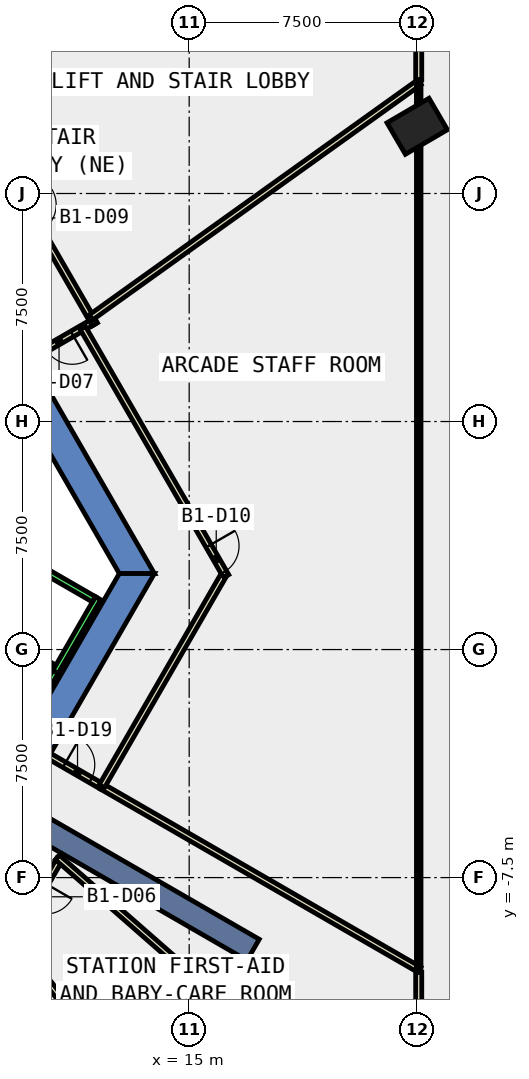
"""IFC4 building model, lengths in metres.
Left out: names, types, materials, properties, quantities, classifications, styles, units other than length and angle.
Written with IfcOpenShell. Run it as: python <this file> out.ifc"""

import sys

from ifc_helpers import new_model, si_unit, direction, frame, frame_2d, origin, origin_2d, place, context, subcontext, project, spatial, polyline, rectangle, outline, extrude, element, fill, save


model = new_model("IFC4")
c1 = context("Model", 3, precision=1e-05, world=origin(), true_north=direction((0.0, 1.0)))
c2 = subcontext(c1, "Body", "Model", "MODEL_VIEW")
j1 = project(units=[si_unit("LENGTHUNIT", "METRE"), si_unit("PLANEANGLEUNIT", "RADIAN")], contexts=[c1])
p1 = place(None, origin())
s1 = spatial("IfcSite", under=j1, at=p1, CompositionType="ELEMENT")
p2 = place(p1, origin())
s2 = spatial("IfcBuilding", under=s1, at=p2, CompositionType="ELEMENT")
p3 = place(p2, frame((0.0, 0.0, -5.5)))
s3 = spatial("IfcBuildingStorey", under=s2, at=p3, CompositionType="ELEMENT", Elevation=-5.5)
p4 = place(p3, frame((22.5, 17.211, -0.42), z_axis=(0.0, 0.0, 1.0), x_axis=(-0.504331712594, 0.863510002068, 0.0)))
e1 = element("IfcColumn", 1, at=p4, inside=s3, PredefinedType="COLUMN", context=c2, shape_type="SweptSolid", body=[
    extrude(rectangle(XDim=1.2, YDim=1.6, at=origin_2d()), origin(), (0.0, 0.0, 1.0), 5.42),
])
p5 = place(p3, frame((0.0, 0.0, -0.42)))
e2 = element("IfcWall", 2, at=p5, inside=s3, PredefinedType="SHEAR", context=c2, shape_type="SweptSolid", body=[
    extrude(outline(polyline([(8.517, 11.748), (7.651, 11.248), (12.702, 2.5), (13.856, 2.5), (8.517, 11.748)])), origin(), (0.0, 0.0, 1.0), 5.42),
])
p6 = place(p3, frame((0.0, 0.0, -0.42)))
e3 = element("IfcWall", 3, at=p6, inside=s3, PredefinedType="SHEAR", context=c2, shape_type="SweptSolid", body=[
    extrude(outline(polyline([(6.928, -9.5), (13.856, 2.5), (12.702, 2.5), (6.351, -8.5), (6.928, -9.5)])), origin(), (0.0, 0.0, 1.0), 5.42),
])
p7 = place(p3, frame((9.31, -5.375, -0.42), z_axis=(0.0, 0.0, 1.0), x_axis=(0.866017533419, -0.500013631625, 0.0)))
e4 = element("IfcWall", 4, at=p7, inside=s3, PredefinedType="SHEAR", context=c2, shape_type="SweptSolid", body=[
    extrude(rectangle(XDim=9.0, YDim=0.8, at=frame_2d((4.5, 0.0))), origin(), (0.0, 0.0, 1.0), 5.42),
])
p8 = place(p3, frame((10.738, -6.901, 0.0), z_axis=(0.0, 0.0, 1.0), x_axis=(-0.500131122175, -0.865949687125, 0.0)))
e5 = element("IfcWall", 5, at=p8, inside=s3, PredefinedType="PARTITIONING", context=c2, shape_type="SweptSolid", body=[
    extrude(rectangle(XDim=2.999, YDim=0.2, at=frame_2d((1.5, 0.0))), origin(), (0.0, 0.0, 1.0), 4.9),
])
p9 = place(p8, frame((0.921, 0.0, 0.0)))
e6 = element("IfcOpeningElement", 6, at=p9, cuts=e5, PredefinedType="OPENING", context=c2, shape_type="SweptSolid", body=[
    extrude(rectangle(XDim=1.0, YDim=2.1, at=frame_2d((0.5, 1.05))), frame((0.0, 0.11, 0.0), z_axis=(0.0, -1.0, 0.0), x_axis=(1.0, 0.0, 0.0)), (0.0, 0.0, 1.0), 0.22),
])
p10 = place(p3, frame((9.177, -9.419, 0.0), z_axis=(0.0, 0.0, 1.0), x_axis=(0.610138829962, -0.792294521104, 0.0)))
e7 = element("IfcWall", 7, at=p10, inside=s3, PredefinedType="PARTITIONING", context=c2, shape_type="SweptSolid", body=[
    extrude(rectangle(XDim=7.082, YDim=0.2, at=frame_2d((3.541, 0.0))), origin(), (0.0, 0.0, 1.0), 4.9),
])
p11 = place(p3, frame((10.663, -6.835, 0.0), z_axis=(0.0, 0.0, 1.0), x_axis=(0.752369729321, -0.658741064761, 0.0)))
e8 = element("IfcWall", 8, at=p11, inside=s3, PredefinedType="PARTITIONING", context=c2, shape_type="SweptSolid", body=[
    extrude(rectangle(XDim=12.571, YDim=0.2, at=frame_2d((6.286, 0.0))), origin(), (0.0, 0.0, 1.0), 4.9),
])
p12 = place(p3, frame((10.392, -3.5, 0.0), z_axis=(0.0, 0.0, 1.0), x_axis=(0.866010750942, -0.50002537861, 0.0)))
e9 = element("IfcWall", 9, at=p12, inside=s3, PredefinedType="PARTITIONING", context=c2, shape_type="SweptSolid", body=[
    extrude(rectangle(XDim=2.0, YDim=0.2, at=frame_2d((1.0, 0.0))), origin(), (0.0, 0.0, 1.0), 4.9),
])
p13 = place(p12, frame((0.58, 0.0, 0.0)))
e10 = element("IfcOpeningElement", 10, at=p13, cuts=e9, PredefinedType="OPENING", context=c2, shape_type="SweptSolid", body=[
    extrude(rectangle(XDim=1.0, YDim=2.1, at=frame_2d((0.5, 1.05))), frame((0.0, 0.11, 0.0), z_axis=(0.0, -1.0, 0.0), x_axis=(1.0, 0.0, 0.0)), (0.0, 0.0, 1.0), 0.22),
])
p14 = place(p3, frame((12.124, -4.5, 0.0), z_axis=(0.0, 0.0, 1.0), x_axis=(0.866066629319, -0.499928588481, 0.0)))
e11 = element("IfcWall", 11, at=p14, inside=s3, PredefinedType="PARTITIONING", context=c2, shape_type="SweptSolid", body=[
    extrude(rectangle(XDim=12.064, YDim=0.2, at=frame_2d((6.032, 0.0))), origin(), (0.0, 0.0, 1.0), 4.9),
])
p15 = place(p3, frame((22.55, -10.619, 0.0), z_axis=(0.0, 0.0, 1.0), x_axis=(0.0, -1.0, 0.0)))
e12 = element("IfcWall", 12, at=p15, inside=s3, PredefinedType="PARTITIONING", context=c2, shape_type="SweptSolid", body=[
    extrude(rectangle(XDim=4.531, YDim=0.2, at=frame_2d((2.266, 0.0))), origin(), (0.0, 0.0, 1.0), 4.9),
])
p16 = place(p3, frame((11.845, 10.783, 0.0), z_axis=(0.0, 0.0, 1.0), x_axis=(-0.865973769406, -0.500089422704, 0.0)))
e13 = element("IfcWall", 13, at=p16, inside=s3, PredefinedType="PARTITIONING", context=c2, shape_type="SweptSolid", body=[
    extrude(rectangle(XDim=2.399, YDim=0.2, at=frame_2d((1.2, 0.0))), origin(), (0.0, 0.0, 1.0), 4.9),
])
p17 = place(p16, frame((0.8, 0.0, 0.0)))
e14 = element("IfcOpeningElement", 14, at=p17, cuts=e13, PredefinedType="OPENING", context=c2, shape_type="SweptSolid", body=[
    extrude(rectangle(XDim=1.0, YDim=2.1, at=frame_2d((0.5, 1.05))), frame((0.0, 0.11, 0.0), z_axis=(0.0, -1.0, 0.0), x_axis=(1.0, 0.0, 0.0)), (0.0, 0.0, 1.0), 0.22),
])
p18 = place(p3, frame((8.295, 16.932, 0.0), z_axis=(0.0, 0.0, 1.0), x_axis=(0.499982693035, -0.866035395735, 0.0)))
e15 = element("IfcWall", 15, at=p18, inside=s3, PredefinedType="PARTITIONING", context=c2, shape_type="SweptSolid", body=[
    extrude(rectangle(XDim=7.2, YDim=0.2, at=frame_2d((3.6, 0.0))), origin(), (0.0, 0.0, 1.0), 4.9),
])
p19 = place(p18, frame((2.659, 0.0, 0.0)))
e16 = element("IfcOpeningElement", 16, at=p19, cuts=e15, PredefinedType="OPENING", context=c2, shape_type="SweptSolid", body=[
    extrude(rectangle(XDim=1.0, YDim=2.1, at=frame_2d((0.5, 1.05))), frame((0.0, 0.11, 0.0), z_axis=(0.0, -1.0, 0.0), x_axis=(1.0, 0.0, 0.0)), (0.0, 0.0, 1.0), 0.22),
])
p20 = place(p3, frame((11.499, 10.583, 0.0), z_axis=(0.0, 0.0, 1.0), x_axis=(0.499933044277, -0.866064057238, 0.0)))
e17 = element("IfcWall", 17, at=p20, inside=s3, PredefinedType="PARTITIONING", context=c2, shape_type="SweptSolid", body=[
    extrude(rectangle(XDim=9.433, YDim=0.2, at=frame_2d((4.717, 0.0))), origin(), (0.0, 0.0, 1.0), 4.9),
])
p21 = place(p20, frame((8.283, 0.0, 0.0)))
e18 = element("IfcOpeningElement", 18, at=p21, cuts=e17, PredefinedType="OPENING", context=c2, shape_type="SweptSolid", body=[
    extrude(rectangle(XDim=1.0, YDim=2.1, at=frame_2d((0.5, 1.05))), frame((0.0, 0.11, 0.0), z_axis=(0.0, -1.0, 0.0), x_axis=(1.0, 0.0, 0.0)), (0.0, 0.0, 1.0), 0.22),
])
p22 = place(p3, frame((16.115, 2.413, 0.0), z_axis=(0.0, 0.0, 1.0), x_axis=(-0.499971321283, -0.866041960816, 0.0)))
e19 = element("IfcWall", 19, at=p22, inside=s3, PredefinedType="PARTITIONING", context=c2, shape_type="SweptSolid", body=[
    extrude(rectangle(XDim=7.982, YDim=0.2, at=frame_2d((3.991, 0.0))), origin(), (0.0, 0.0, 1.0), 4.9),
])
p23 = place(p3, frame((22.57, 18.658, 0.0), z_axis=(0.0, 0.0, 1.0), x_axis=(-0.813097421088, -0.582127635334, 0.0)))
e20 = element("IfcWall", 20, at=p23, inside=s3, PredefinedType="PARTITIONING", context=c2, shape_type="SweptSolid", body=[
    extrude(rectangle(XDim=13.289, YDim=0.2, at=frame_2d((6.645, 0.0))), origin(), (0.0, 0.0, 1.0), 4.9),
])
p24 = place(p3, frame((22.55, 22.45, 0.0), z_axis=(0.0, 0.0, 1.0), x_axis=(0.0, -1.0, 0.0)))
e21 = element("IfcWall", 21, at=p24, inside=s3, PredefinedType="PARTITIONING", context=c2, shape_type="SweptSolid", body=[
    extrude(rectangle(XDim=3.707, YDim=0.2, at=frame_2d((1.854, 0.0))), origin(), (0.0, 0.0, 1.0), 4.9),
])
p25 = place(p3, frame((22.55, 18.743, 0.0), z_axis=(0.0, 0.0, 1.0), x_axis=(0.0, -1.0, 0.0)))
e22 = element("IfcWall", 22, at=p25, inside=s3, PredefinedType="PARTITIONING", context=c2, shape_type="SweptSolid", body=[
    extrude(rectangle(XDim=29.362, YDim=0.15, at=frame_2d((14.681, 0.0))), origin(), (0.0, 0.0, 1.0), 4.9),
])
p26 = place(p3, frame((9.303, -2.987, 0.0), z_axis=(0.0, 0.0, 1.0), x_axis=(0.49994636267, 0.866056369097, 0.0)))
e23 = element("IfcWall", 23, at=p26, inside=s3, PredefinedType="STANDARD", context=c2, shape_type="SweptSolid", body=[
    extrude(rectangle(XDim=2.8, YDim=0.2, at=frame_2d((1.4, 0.0))), origin(), (0.0, 0.0, 1.0), 3.6),
])
p27 = place(p3, frame((8.488, 0.602, 0.0), z_axis=(0.0, 0.0, 1.0), x_axis=(0.865973769406, -0.500089422704, 0.0)))
e24 = element("IfcWall", 24, at=p27, inside=s3, PredefinedType="STANDARD", context=c2, shape_type="SweptSolid", body=[
    extrude(rectangle(XDim=2.399, YDim=0.2, at=frame_2d((1.2, 0.0))), origin(), (0.0, 0.0, 1.0), 3.6),
])
p28 = place(p3, frame((10.603, -0.735, 0.0), z_axis=(0.0, 0.0, 1.0), x_axis=(0.49994636267, 0.866056369097, 0.0)))
e25 = element("IfcWall", 25, at=p28, inside=s3, PredefinedType="STANDARD", context=c2, shape_type="SweptSolid", body=[
    extrude(rectangle(XDim=2.8, YDim=0.2, at=frame_2d((1.4, 0.0))), origin(), (0.0, 0.0, 1.0), 3.6),
])
p29 = place(p3, frame((9.788, 2.853, 0.0), z_axis=(0.0, 0.0, 1.0), x_axis=(0.865973769406, -0.500089422704, 0.0)))
e26 = element("IfcWall", 26, at=p29, inside=s3, PredefinedType="STANDARD", context=c2, shape_type="SweptSolid", body=[
    extrude(rectangle(XDim=2.399, YDim=0.2, at=frame_2d((1.2, 0.0))), origin(), (0.0, 0.0, 1.0), 3.6),
])
p30 = place(p17, origin())
e27 = element("IfcDoor", 27, at=p30, inside=s3, OperationType="SINGLE_SWING_LEFT", PredefinedType="DOOR", context=c2, shape_type="SweptSolid", body=[
    extrude(rectangle(XDim=1.0, YDim=2.1, at=frame_2d((0.5, 1.05))), frame((0.0, 0.025, 0.0), z_axis=(0.0, -1.0, 0.0), x_axis=(1.0, 0.0, 0.0)), (0.0, 0.0, 1.0), 0.05),
])
fill(e14, e27)
p31 = place(p21, origin())
e28 = element("IfcDoor", 28, at=p31, inside=s3, OperationType="SINGLE_SWING_RIGHT", PredefinedType="DOOR", context=c2, shape_type="SweptSolid", body=[
    extrude(rectangle(XDim=1.0, YDim=2.1, at=frame_2d((0.5, 1.05))), frame((0.0, 0.025, 0.0), z_axis=(0.0, -1.0, 0.0), x_axis=(1.0, 0.0, 0.0)), (0.0, 0.0, 1.0), 0.05),
])
fill(e18, e28)
p32 = place(p13, origin())
e29 = element("IfcDoor", 29, at=p32, inside=s3, OperationType="SINGLE_SWING_LEFT", PredefinedType="DOOR", context=c2, shape_type="SweptSolid", body=[
    extrude(rectangle(XDim=1.0, YDim=2.1, at=frame_2d((0.5, 1.05))), frame((0.0, 0.025, 0.0), z_axis=(0.0, -1.0, 0.0), x_axis=(1.0, 0.0, 0.0)), (0.0, 0.0, 1.0), 0.05),
])
fill(e10, e29)
save(model, sys.argv[1])
